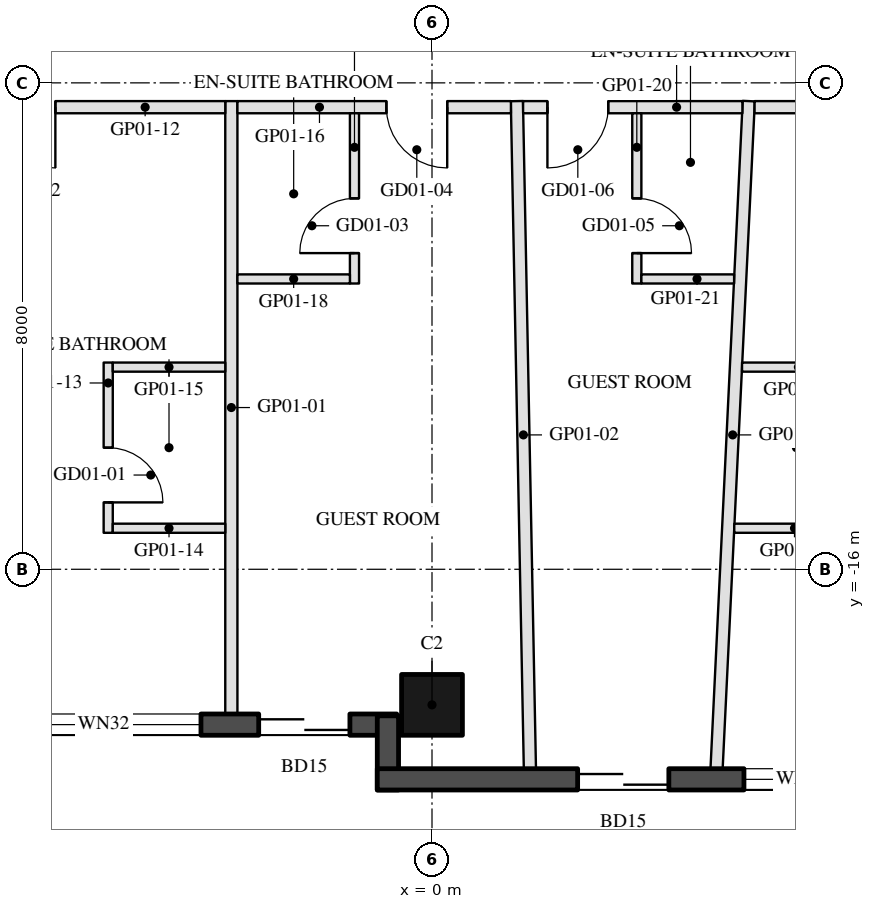
"""IFC4 building model, lengths in metres.
Left out: names, types, materials, properties, quantities, classifications, styles, units other than length and angle.
Written with IfcOpenShell. Run it as: python <this file> out.ifc"""

import sys

from ifc_helpers import new_model, si_unit, direction, frame, frame_2d, origin, origin_2d, place, context, subcontext, project, spatial, rectangle, hollow_rectangle, extrude, element, fill, save


model = new_model("IFC4")
c1 = context("Model", 3, precision=1e-05, world=origin(), true_north=direction((0.0, 1.0)))
c2 = subcontext(c1, "Body", "Model", "MODEL_VIEW")
j1 = project(units=[si_unit("LENGTHUNIT", "METRE"), si_unit("PLANEANGLEUNIT", "RADIAN")], contexts=[c1])
p1 = place(None, origin())
s1 = spatial("IfcSite", under=j1, at=p1, CompositionType="ELEMENT")
p2 = place(p1, origin())
s2 = spatial("IfcBuilding", under=s1, at=p2, CompositionType="ELEMENT")
p3 = place(p2, frame((0.0, 0.0, 46.5)))
s3 = spatial("IfcBuildingStorey", under=s2, at=p3, CompositionType="ELEMENT", Elevation=46.5)
p4 = place(p3, frame((0.0, -18.23, 0.0), z_axis=(0.0, 0.0, 1.0), x_axis=(-1.0, 0.0, 0.0)))
e1 = element("IfcColumn", 1, at=p4, inside=s3, PredefinedType="COLUMN", context=c2, shape_type="SweptSolid", body=[
    extrude(hollow_rectangle(XDim=1.0, YDim=1.0, WallThickness=0.045, at=origin_2d()), origin(), (0.0, 0.0, 1.0), 3.7),
])
p5 = place(p3, frame((-7.32, -18.555, 0.0), z_axis=(0.0, 0.0, 1.0), x_axis=(1.0, 0.0, 0.0)))
e2 = element("IfcWall", 2, at=p5, inside=s3, PredefinedType="SOLIDWALL", context=c2, shape_type="SweptSolid", body=[
    extrude(rectangle(XDim=6.74, YDim=0.35, at=frame_2d((3.37, 0.0))), origin(), (0.0, 0.0, 1.0), 3.55),
])
p6 = place(p5, frame((0.32, 0.0, 0.3)))
e3 = element("IfcOpeningElement", 3, at=p6, cuts=e2, PredefinedType="OPENING", context=c2, shape_type="SweptSolid", body=[
    extrude(rectangle(XDim=3.2, YDim=2.65, at=frame_2d((1.6, 1.325))), frame((0.0, 0.185, 0.0), z_axis=(0.0, -1.0, 0.0), x_axis=(1.0, 0.0, 0.0)), (0.0, 0.0, 1.0), 0.37),
])
p7 = place(p5, frame((4.47, 0.0, 0.0)))
e4 = element("IfcOpeningElement", 4, at=p7, cuts=e2, PredefinedType="OPENING", context=c2, shape_type="SweptSolid", body=[
    extrude(rectangle(XDim=1.5, YDim=2.4, at=frame_2d((0.75, 1.2))), frame((0.0, 0.185, 0.0), z_axis=(0.0, -1.0, 0.0), x_axis=(1.0, 0.0, 0.0)), (0.0, 0.0, 1.0), 0.37),
])
p8 = place(p3, frame((-0.725, -18.41, 0.0), z_axis=(0.0, 0.0, 1.0), x_axis=(0.0, -1.0, 0.0)))
e5 = element("IfcWall", 5, at=p8, inside=s3, PredefinedType="SOLIDWALL", context=c2, shape_type="SweptSolid", body=[
    extrude(rectangle(XDim=1.22, YDim=0.35, at=frame_2d((0.61, 0.0))), origin(), (0.0, 0.0, 1.0), 3.55),
])
p9 = place(p3, frame((-0.9, -19.455, 0.0), z_axis=(0.0, 0.0, 1.0), x_axis=(1.0, 0.0, 0.0)))
e6 = element("IfcWall", 6, at=p9, inside=s3, PredefinedType="SOLIDWALL", context=c2, shape_type="SweptSolid", body=[
    extrude(rectangle(XDim=9.7, YDim=0.35, at=frame_2d((4.85, 0.0))), origin(), (0.0, 0.0, 1.0), 3.55),
])
p10 = place(p9, frame((3.295, 0.0, 0.0)))
e7 = element("IfcOpeningElement", 7, at=p10, cuts=e6, PredefinedType="OPENING", context=c2, shape_type="SweptSolid", body=[
    extrude(rectangle(XDim=1.5, YDim=2.4, at=frame_2d((0.75, 1.2))), frame((0.0, 0.185, 0.0), z_axis=(0.0, -1.0, 0.0), x_axis=(1.0, 0.0, 0.0)), (0.0, 0.0, 1.0), 0.37),
])
p11 = place(p9, frame((6.03, 0.0, 0.3)))
e8 = element("IfcOpeningElement", 8, at=p11, cuts=e6, PredefinedType="OPENING", context=c2, shape_type="SweptSolid", body=[
    extrude(rectangle(XDim=1.9, YDim=2.65, at=frame_2d((0.95, 1.325))), frame((0.0, 0.185, 0.0), z_axis=(0.0, -1.0, 0.0), x_axis=(1.0, 0.0, 0.0)), (0.0, 0.0, 1.0), 0.37),
])
p12 = place(p3, frame((-3.3, -18.38, 0.0), z_axis=(0.0, 0.0, 1.0), x_axis=(0.0, 1.0, 0.0)))
e9 = element("IfcWall", 9, at=p12, inside=s3, PredefinedType="PARTITIONING", context=c2, shape_type="SweptSolid", body=[
    extrude(rectangle(XDim=10.08, YDim=0.2, at=frame_2d((5.04, 0.0))), origin(), (0.0, 0.0, 1.0), 2.96),
])
p13 = place(p3, frame((1.61, -19.28, 0.0), z_axis=(0.0, 0.0, 1.0), x_axis=(-0.019496449176, 0.999809926171, 0.0)))
e10 = element("IfcWall", 10, at=p13, inside=s3, PredefinedType="PARTITIONING", context=c2, shape_type="SweptSolid", body=[
    extrude(rectangle(XDim=10.982, YDim=0.2, at=frame_2d((5.491, 0.0))), origin(), (0.0, 0.0, 1.0), 2.96),
])
p14 = place(p3, frame((4.68, -19.28, 0.0), z_axis=(0.0, 0.0, 1.0), x_axis=(0.048194033078, 0.998837992457, 0.0)))
e11 = element("IfcWall", 11, at=p14, inside=s3, PredefinedType="PARTITIONING", context=c2, shape_type="SweptSolid", body=[
    extrude(rectangle(XDim=10.993, YDim=0.2, at=frame_2d((5.496, 0.0))), origin(), (0.0, 0.0, 1.0), 2.96),
])
p15 = place(p3, frame((-3.4, -8.4, 0.0), z_axis=(0.0, 0.0, 1.0), x_axis=(-1.0, 0.0, 0.0)))
e12 = element("IfcWall", 12, at=p15, inside=s3, PredefinedType="PARTITIONING", context=c2, shape_type="SweptSolid", body=[
    extrude(rectangle(XDim=6.588, YDim=0.2, at=frame_2d((3.294, 0.0))), origin(), (0.0, 0.0, 1.0), 2.95),
])
p16 = place(p15, frame((2.794, 0.0, 0.0)))
e13 = element("IfcOpeningElement", 13, at=p16, cuts=e12, PredefinedType="OPENING", context=c2, shape_type="SweptSolid", body=[
    extrude(rectangle(XDim=1.0, YDim=2.1, at=frame_2d((0.5, 1.05))), frame((0.0, 0.11, 0.0), z_axis=(0.0, -1.0, 0.0), x_axis=(1.0, 0.0, 0.0)), (0.0, 0.0, 1.0), 0.22),
])
p17 = place(p3, frame((-5.325, -12.6, 0.0), z_axis=(0.0, 0.0, 1.0), x_axis=(0.0, -1.0, 0.0)))
e14 = element("IfcWall", 14, at=p17, inside=s3, PredefinedType="PARTITIONING", context=c2, shape_type="SweptSolid", body=[
    extrude(rectangle(XDim=2.8, YDim=0.15, at=frame_2d((1.4, 0.0))), origin(), (0.0, 0.0, 1.0), 3.55),
])
p18 = place(p17, frame((1.4, 0.0, 0.0)))
e15 = element("IfcOpeningElement", 15, at=p18, cuts=e14, PredefinedType="OPENING", context=c2, shape_type="SweptSolid", body=[
    extrude(rectangle(XDim=0.9, YDim=2.1, at=frame_2d((0.45, 1.05))), frame((0.0, 0.085, 0.0), z_axis=(0.0, -1.0, 0.0), x_axis=(1.0, 0.0, 0.0)), (0.0, 0.0, 1.0), 0.17),
])
for number, where, z_axis, x_axis in (
    (16, (-5.25, -15.325, 0.0), (0.0, 0.0, 1.0), (1.0, 0.0, 0.0)),
    (17, (-5.25, -12.675, 0.0), (0.0, 0.0, 1.0), (1.0, 0.0, 0.0)),
):
    element("IfcWall", number, at=place(p3, frame(where, z_axis=z_axis, x_axis=x_axis)), inside=s3, PredefinedType="PARTITIONING", context=c2, shape_type="SweptSolid", body=[
        extrude(rectangle(XDim=1.85, YDim=0.15, at=frame_2d((0.925, 0.0))), origin(), (0.0, 0.0, 1.0), 2.95),
    ])
p19 = place(p3, frame((1.298, -8.4, 0.0), z_axis=(0.0, 0.0, 1.0), x_axis=(-1.0, 0.0, 0.0)))
e18 = element("IfcWall", 18, at=p19, inside=s3, PredefinedType="PARTITIONING", context=c2, shape_type="SweptSolid", body=[
    extrude(rectangle(XDim=4.498, YDim=0.2, at=frame_2d((2.249, 0.0))), origin(), (0.0, 0.0, 1.0), 2.95),
])
p20 = place(p19, frame((1.048, 0.0, 0.0)))
e19 = element("IfcOpeningElement", 19, at=p20, cuts=e18, PredefinedType="OPENING", context=c2, shape_type="SweptSolid", body=[
    extrude(rectangle(XDim=1.0, YDim=2.1, at=frame_2d((0.5, 1.05))), frame((0.0, 0.11, 0.0), z_axis=(0.0, -1.0, 0.0), x_axis=(1.0, 0.0, 0.0)), (0.0, 0.0, 1.0), 0.22),
])
p21 = place(p3, frame((-1.275, -11.3, 0.0), z_axis=(0.0, 0.0, 1.0), x_axis=(0.0, 1.0, 0.0)))
e20 = element("IfcWall", 20, at=p21, inside=s3, PredefinedType="PARTITIONING", context=c2, shape_type="SweptSolid", body=[
    extrude(rectangle(XDim=2.8, YDim=0.15, at=frame_2d((1.4, 0.0))), origin(), (0.0, 0.0, 1.0), 3.55),
])
p22 = place(p21, frame((0.5, 0.0, 0.0)))
e21 = element("IfcOpeningElement", 21, at=p22, cuts=e20, PredefinedType="OPENING", context=c2, shape_type="SweptSolid", body=[
    extrude(rectangle(XDim=0.9, YDim=2.1, at=frame_2d((0.45, 1.05))), frame((0.0, 0.085, 0.0), z_axis=(0.0, -1.0, 0.0), x_axis=(1.0, 0.0, 0.0)), (0.0, 0.0, 1.0), 0.17),
])
p23 = place(p3, frame((-3.2, -11.225, 0.0), z_axis=(0.0, 0.0, 1.0), x_axis=(1.0, 0.0, 0.0)))
e22 = element("IfcWall", 22, at=p23, inside=s3, PredefinedType="PARTITIONING", context=c2, shape_type="SweptSolid", body=[
    extrude(rectangle(XDim=1.85, YDim=0.15, at=frame_2d((0.925, 0.0))), origin(), (0.0, 0.0, 1.0), 3.55),
])
p24 = place(p3, frame((5.105, -8.4, 0.0), z_axis=(0.0, 0.0, 1.0), x_axis=(-1.0, 0.0, 0.0)))
e23 = element("IfcWall", 23, at=p24, inside=s3, PredefinedType="PARTITIONING", context=c2, shape_type="SweptSolid", body=[
    extrude(rectangle(XDim=3.607, YDim=0.2, at=frame_2d((1.803, 0.0))), origin(), (0.0, 0.0, 1.0), 2.95),
])
p25 = place(p24, frame((2.207, 0.0, 0.0)))
e24 = element("IfcOpeningElement", 24, at=p25, cuts=e23, PredefinedType="OPENING", context=c2, shape_type="SweptSolid", body=[
    extrude(rectangle(XDim=1.0, YDim=2.1, at=frame_2d((0.5, 1.05))), frame((0.0, 0.11, 0.0), z_axis=(0.0, -1.0, 0.0), x_axis=(1.0, 0.0, 0.0)), (0.0, 0.0, 1.0), 0.22),
])
p26 = place(p3, frame((3.368, -8.5, 0.0), z_axis=(0.0, 0.0, 1.0), x_axis=(0.0, -1.0, 0.0)))
e25 = element("IfcWall", 25, at=p26, inside=s3, PredefinedType="PARTITIONING", context=c2, shape_type="SweptSolid", body=[
    extrude(rectangle(XDim=2.8, YDim=0.15, at=frame_2d((1.4, 0.0))), origin(), (0.0, 0.0, 1.0), 3.55),
])
p27 = place(p26, frame((1.4, 0.0, 0.0)))
e26 = element("IfcOpeningElement", 26, at=p27, cuts=e25, PredefinedType="OPENING", context=c2, shape_type="SweptSolid", body=[
    extrude(rectangle(XDim=0.9, YDim=2.1, at=frame_2d((0.45, 1.05))), frame((0.0, 0.085, 0.0), z_axis=(0.0, -1.0, 0.0), x_axis=(1.0, 0.0, 0.0)), (0.0, 0.0, 1.0), 0.17),
])
p28 = place(p3, frame((3.443, -11.225, 0.0), z_axis=(0.0, 0.0, 1.0), x_axis=(1.0, 0.0, 0.0)))
e27 = element("IfcWall", 27, at=p28, inside=s3, PredefinedType="PARTITIONING", context=c2, shape_type="SweptSolid", body=[
    extrude(rectangle(XDim=1.525, YDim=0.15, at=frame_2d((0.763, 0.0))), origin(), (0.0, 0.0, 1.0), 2.95),
])
p29 = place(p3, frame((9.988, -8.4, 0.0), z_axis=(0.0, 0.0, 1.0), x_axis=(-1.0, 0.0, 0.0)))
e28 = element("IfcWall", 28, at=p29, inside=s3, PredefinedType="PARTITIONING", context=c2, shape_type="SweptSolid", body=[
    extrude(rectangle(XDim=4.683, YDim=0.2, at=frame_2d((2.342, 0.0))), origin(), (0.0, 0.0, 1.0), 2.95),
])
p30 = place(p29, frame((1.842, 0.0, 0.0)))
e29 = element("IfcOpeningElement", 29, at=p30, cuts=e28, PredefinedType="OPENING", context=c2, shape_type="SweptSolid", body=[
    extrude(rectangle(XDim=1.0, YDim=2.1, at=frame_2d((0.5, 1.05))), frame((0.0, 0.11, 0.0), z_axis=(0.0, -1.0, 0.0), x_axis=(1.0, 0.0, 0.0)), (0.0, 0.0, 1.0), 0.22),
])
p31 = place(p3, frame((4.971, -15.325, 0.0), z_axis=(0.0, 0.0, 1.0), x_axis=(1.0, 0.0, 0.0)))
e30 = element("IfcWall", 30, at=p31, inside=s3, PredefinedType="PARTITIONING", context=c2, shape_type="SweptSolid", body=[
    extrude(rectangle(XDim=1.981, YDim=0.15, at=frame_2d((0.991, 0.0))), origin(), (0.0, 0.0, 1.0), 3.55),
])
p32 = place(p3, frame((5.099, -12.675, 0.0), z_axis=(0.0, 0.0, 1.0), x_axis=(1.0, 0.0, 0.0)))
e31 = element("IfcWall", 31, at=p32, inside=s3, PredefinedType="PARTITIONING", context=c2, shape_type="SweptSolid", body=[
    extrude(rectangle(XDim=1.854, YDim=0.15, at=frame_2d((0.927, 0.0))), origin(), (0.0, 0.0, 1.0), 3.55),
])
p33 = place(p6, origin())
e32 = element("IfcWindow", 32, at=p33, inside=s3, PartitioningType="SINGLE_PANEL", PredefinedType="WINDOW", context=c2, shape_type="SweptSolid", body=[
    extrude(rectangle(XDim=3.2, YDim=2.65, at=frame_2d((1.6, 1.325))), frame((0.0, 0.03, 0.0), z_axis=(0.0, -1.0, 0.0), x_axis=(1.0, 0.0, 0.0)), (0.0, 0.0, 1.0), 0.06),
])
fill(e3, e32)
p34 = place(p7, frame((1.5, 0.0, 0.0), z_axis=(0.0, 0.0, 1.0), x_axis=(-1.0, 0.0, 0.0)))
e33 = element("IfcDoor", 33, at=p34, inside=s3, OperationType="SLIDING_TO_LEFT", PredefinedType="DOOR", context=c2, shape_type="SweptSolid", body=[
    extrude(rectangle(XDim=1.5, YDim=2.4, at=frame_2d((0.75, 1.2))), frame((0.0, 0.025, 0.0), z_axis=(0.0, -1.0, 0.0), x_axis=(1.0, 0.0, 0.0)), (0.0, 0.0, 1.0), 0.05),
])
fill(e4, e33)
p35 = place(p10, frame((1.5, 0.0, 0.0), z_axis=(0.0, 0.0, 1.0), x_axis=(-1.0, 0.0, 0.0)))
e34 = element("IfcDoor", 34, at=p35, inside=s3, OperationType="SLIDING_TO_LEFT", PredefinedType="DOOR", context=c2, shape_type="SweptSolid", body=[
    extrude(rectangle(XDim=1.5, YDim=2.4, at=frame_2d((0.75, 1.2))), frame((0.0, 0.025, 0.0), z_axis=(0.0, -1.0, 0.0), x_axis=(1.0, 0.0, 0.0)), (0.0, 0.0, 1.0), 0.05),
])
fill(e7, e34)
p36 = place(p11, origin())
e35 = element("IfcWindow", 35, at=p36, inside=s3, PartitioningType="SINGLE_PANEL", PredefinedType="WINDOW", context=c2, shape_type="SweptSolid", body=[
    extrude(rectangle(XDim=1.9, YDim=2.65, at=frame_2d((0.95, 1.325))), frame((0.0, 0.03, 0.0), z_axis=(0.0, -1.0, 0.0), x_axis=(1.0, 0.0, 0.0)), (0.0, 0.0, 1.0), 0.06),
])
fill(e8, e35)
p37 = place(p18, origin())
e36 = element("IfcDoor", 36, at=p37, inside=s3, OperationType="SINGLE_SWING_RIGHT", PredefinedType="DOOR", context=c2, shape_type="SweptSolid", body=[
    extrude(rectangle(XDim=0.9, YDim=2.1, at=frame_2d((0.45, 1.05))), frame((0.0, 0.025, 0.0), z_axis=(0.0, -1.0, 0.0), x_axis=(1.0, 0.0, 0.0)), (0.0, 0.0, 1.0), 0.05),
])
fill(e15, e36)
p38 = place(p16, origin())
e37 = element("IfcDoor", 37, at=p38, inside=s3, OperationType="SINGLE_SWING_LEFT", PredefinedType="DOOR", context=c2, shape_type="SweptSolid", body=[
    extrude(rectangle(XDim=1.0, YDim=2.1, at=frame_2d((0.5, 1.05))), frame((0.0, 0.025, 0.0), z_axis=(0.0, -1.0, 0.0), x_axis=(1.0, 0.0, 0.0)), (0.0, 0.0, 1.0), 0.05),
])
fill(e13, e37)
p39 = place(p22, origin())
e38 = element("IfcDoor", 38, at=p39, inside=s3, OperationType="SINGLE_SWING_LEFT", PredefinedType="DOOR", context=c2, shape_type="SweptSolid", body=[
    extrude(rectangle(XDim=0.9, YDim=2.1, at=frame_2d((0.45, 1.05))), frame((0.0, 0.025, 0.0), z_axis=(0.0, -1.0, 0.0), x_axis=(1.0, 0.0, 0.0)), (0.0, 0.0, 1.0), 0.05),
])
fill(e21, e38)
p40 = place(p20, origin())
e39 = element("IfcDoor", 39, at=p40, inside=s3, OperationType="SINGLE_SWING_LEFT", PredefinedType="DOOR", context=c2, shape_type="SweptSolid", body=[
    extrude(rectangle(XDim=1.0, YDim=2.1, at=frame_2d((0.5, 1.05))), frame((0.0, 0.025, 0.0), z_axis=(0.0, -1.0, 0.0), x_axis=(1.0, 0.0, 0.0)), (0.0, 0.0, 1.0), 0.05),
])
fill(e19, e39)
p41 = place(p27, origin())
e40 = element("IfcDoor", 40, at=p41, inside=s3, OperationType="SINGLE_SWING_RIGHT", PredefinedType="DOOR", context=c2, shape_type="SweptSolid", body=[
    extrude(rectangle(XDim=0.9, YDim=2.1, at=frame_2d((0.45, 1.05))), frame((0.0, 0.025, 0.0), z_axis=(0.0, -1.0, 0.0), x_axis=(1.0, 0.0, 0.0)), (0.0, 0.0, 1.0), 0.05),
])
fill(e26, e40)
p42 = place(p25, origin())
e41 = element("IfcDoor", 41, at=p42, inside=s3, OperationType="SINGLE_SWING_RIGHT", PredefinedType="DOOR", context=c2, shape_type="SweptSolid", body=[
    extrude(rectangle(XDim=1.0, YDim=2.1, at=frame_2d((0.5, 1.05))), frame((0.0, 0.025, 0.0), z_axis=(0.0, -1.0, 0.0), x_axis=(1.0, 0.0, 0.0)), (0.0, 0.0, 1.0), 0.05),
])
fill(e24, e41)
save(model, sys.argv[1])
